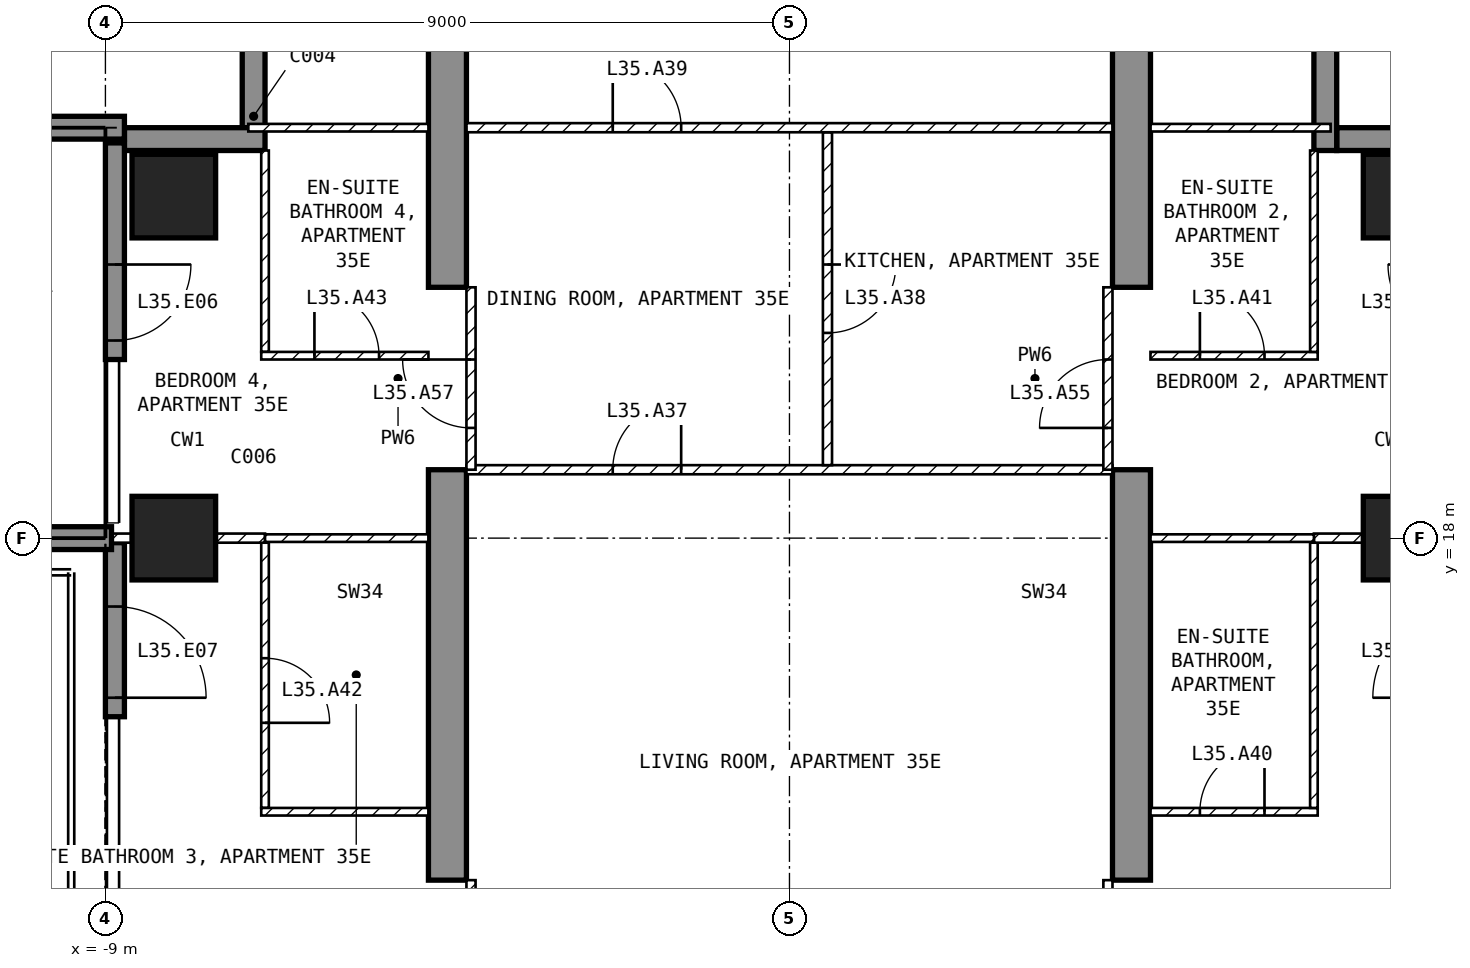
"""IFC4 building model, lengths in metres.
Left out: names, types, materials, properties, quantities, classifications, styles, units other than length and angle.
Written with IfcOpenShell. Run it as: python <this file> out.ifc"""

import sys

from ifc_helpers import new_model, si_unit, direction, frame, frame_2d, origin, origin_2d, place, context, subcontext, project, spatial, polyline, rectangle, outline, extrude, element, fill, save


model = new_model("IFC4")
c1 = context("Model", 3, precision=1e-05, world=origin(), true_north=direction((0.0, 1.0)))
c2 = subcontext(c1, "Body", "Model", "MODEL_VIEW")
j1 = project(units=[si_unit("LENGTHUNIT", "METRE"), si_unit("PLANEANGLEUNIT", "RADIAN")], contexts=[c1])
p1 = place(None, origin())
s1 = spatial("IfcSite", under=j1, at=p1, CompositionType="ELEMENT")
p2 = place(p1, origin())
s2 = spatial("IfcBuilding", under=s1, at=p2, CompositionType="ELEMENT")
p3 = place(p2, frame((0.0, 0.0, 144.4)))
s3 = spatial("IfcBuildingStorey", under=s2, at=p3, CompositionType="ELEMENT", Elevation=144.4)
for number, where, z_axis, x_axis in (
    (1, (-8.1, 18.0, -0.25), (0.0, 0.0, 1.0), (1.0, 0.0, 0.0)),
    (2, (-8.1, 22.5, -0.25), (0.0, 0.0, 1.0), (1.0, 0.0, 0.0)),
    (3, (8.1, 18.0, -0.25), (0.0, 0.0, 1.0), (1.0, 0.0, 0.0)),
    (4, (8.1, 22.5, -0.25), (0.0, 0.0, 1.0), (1.0, 0.0, 0.0)),
):
    element("IfcColumn", number, at=place(p3, frame(where, z_axis=z_axis, x_axis=x_axis)), inside=s3, PredefinedType="COLUMN", context=c2, shape_type="SweptSolid", body=[
        extrude(rectangle(XDim=1.1, YDim=1.1, at=origin_2d()), origin(), (0.0, 0.0, 1.0), 3.5),
    ])
for number, where, z_axis, x_axis in (
    (5, (-4.75, 9.0, -0.25), (1.0, 0.0, 0.0), (0.0, 1.0, 0.0)),
    (6, (4.25, 9.0, -0.25), (1.0, 0.0, 0.0), (0.0, 1.0, 0.0)),
):
    element("IfcWall", number, at=place(p3, frame(where, z_axis=z_axis, x_axis=x_axis)), inside=s3, PredefinedType="SHEAR", context=c2, shape_type="SweptSolid", body=[
        extrude(outline(polyline([(0.0, 0.0), (2.1, 0.0), (2.1, 2.65), (4.5, 2.65), (4.5, 0.0), (9.9, 0.0), (9.9, 2.65), (12.3, 2.65), (12.3, 0.0), (16.55, 0.0), (16.55, 3.5), (0.0, 3.5), (0.0, 0.0)])), origin(), (0.0, 0.0, 1.0), 0.5),
    ])
p4 = place(p3, frame((-8.875, 23.2, 0.0), z_axis=(0.0, 0.0, 1.0), x_axis=(0.0, -1.0, 0.0)))
e7 = element("IfcWall", 7, at=p4, inside=s3, PredefinedType="SOLIDWALL", context=c2, shape_type="SweptSolid", body=[
    extrude(rectangle(XDim=2.85, YDim=0.25, at=frame_2d((1.425, 0.0))), origin(), (0.0, 0.0, 1.0), 3.25),
])
p5 = place(p4, frame((1.6, 0.0, 0.0)))
e8 = element("IfcOpeningElement", 8, at=p5, cuts=e7, PredefinedType="OPENING", context=c2, shape_type="SweptSolid", body=[
    extrude(rectangle(XDim=1.0, YDim=2.4, at=frame_2d((0.5, 1.2))), frame((0.0, 0.135, 0.0), z_axis=(0.0, -1.0, 0.0), x_axis=(1.0, 0.0, 0.0)), (0.0, 0.0, 1.0), 0.27),
])
p6 = place(p3, frame((-8.875, 17.94, 0.0), z_axis=(0.0, 0.0, 1.0), x_axis=(0.0, -1.0, 0.0)))
e9 = element("IfcWall", 9, at=p6, inside=s3, PredefinedType="SOLIDWALL", context=c2, shape_type="SweptSolid", body=[
    extrude(rectangle(XDim=2.29, YDim=0.25, at=frame_2d((1.145, 0.0))), origin(), (0.0, 0.0, 1.0), 3.25),
])
p7 = place(p6, frame((0.84, 0.0, 0.0)))
e10 = element("IfcOpeningElement", 10, at=p7, cuts=e9, PredefinedType="OPENING", context=c2, shape_type="SweptSolid", body=[
    extrude(rectangle(XDim=1.2, YDim=2.4, at=frame_2d((0.6, 1.2))), frame((0.0, 0.135, 0.0), z_axis=(0.0, -1.0, 0.0), x_axis=(1.0, 0.0, 0.0)), (0.0, 0.0, 1.0), 0.27),
])
p8 = place(p3, frame((8.75, 23.25, 0.0), z_axis=(0.0, 0.0, 1.0), x_axis=(-1.0, 0.0, 0.0)))
e11 = element("IfcWall", 11, at=p8, inside=s3, PredefinedType="SOLIDWALL", context=c2, shape_type="SweptSolid", body=[
    extrude(rectangle(XDim=1.55, YDim=0.3, at=frame_2d((0.775, 0.0))), origin(), (0.0, 0.0, 1.0), 3.25),
])
p9 = place(p3, frame((7.05, 23.1, 0.0), z_axis=(0.0, 0.0, 1.0), x_axis=(0.0, 1.0, 0.0)))
e12 = element("IfcWall", 12, at=p9, inside=s3, PredefinedType="SOLIDWALL", context=c2, shape_type="SweptSolid", body=[
    extrude(rectangle(XDim=1.8, YDim=0.3, at=frame_2d((0.9, 0.0))), origin(), (0.0, 0.0, 1.0), 3.25),
])
p10 = place(p3, frame((-7.05, 25.2, 0.0), z_axis=(0.0, 0.0, 1.0), x_axis=(0.0, -1.0, 0.0)))
e13 = element("IfcWall", 13, at=p10, inside=s3, PredefinedType="SOLIDWALL", context=c2, shape_type="SweptSolid", body=[
    extrude(rectangle(XDim=1.8, YDim=0.3, at=frame_2d((0.9, 0.0))), origin(), (0.0, 0.0, 1.0), 3.25),
])
p11 = place(p3, frame((-6.9, 23.25, 0.0), z_axis=(0.0, 0.0, 1.0), x_axis=(-1.0, 0.0, 0.0)))
e14 = element("IfcWall", 14, at=p11, inside=s3, PredefinedType="SOLIDWALL", context=c2, shape_type="SweptSolid", body=[
    extrude(rectangle(XDim=1.85, YDim=0.3, at=frame_2d((0.925, 0.0))), origin(), (0.0, 0.0, 1.0), 3.25),
])
p12 = place(p3, frame((-8.92, 18.0, 0.0), z_axis=(0.0, 0.0, 1.0), x_axis=(-1.0, 0.0, 0.0)))
e15 = element("IfcWall", 15, at=p12, inside=s3, PredefinedType="SOLIDWALL", context=c2, shape_type="SweptSolid", body=[
    extrude(rectangle(XDim=2.82, YDim=0.3, at=frame_2d((1.41, 0.0))), origin(), (0.0, 0.0, 1.0), 3.25),
])
p13 = place(p3, frame((-8.75, 23.4, 0.0), z_axis=(0.0, 0.0, 1.0), x_axis=(-1.0, 0.0, 0.0)))
e16 = element("IfcWall", 16, at=p13, inside=s3, PredefinedType="SOLIDWALL", context=c2, shape_type="SweptSolid", body=[
    extrude(rectangle(XDim=2.95, YDim=0.3, at=frame_2d((1.475, 0.0))), origin(), (0.0, 0.0, 1.0), 3.25),
])
p14 = place(p3, frame((-4.25, 18.9, 0.0), z_axis=(0.0, 0.0, 1.0), x_axis=(1.0, 0.0, 0.0)))
e17 = element("IfcWall", 17, at=p14, inside=s3, PredefinedType="PARTITIONING", context=c2, shape_type="SweptSolid", body=[
    extrude(rectangle(XDim=8.5, YDim=0.12, at=frame_2d((4.25, 0.0))), origin(), (0.0, 0.0, 1.0), 3.25),
])
p15 = place(p14, frame((1.925, 0.0, 0.0)))
e18 = element("IfcOpeningElement", 18, at=p15, cuts=e17, PredefinedType="OPENING", context=c2, shape_type="SweptSolid", body=[
    extrude(rectangle(XDim=0.9, YDim=2.1, at=frame_2d((0.45, 1.05))), frame((0.0, 0.07, 0.0), z_axis=(0.0, -1.0, 0.0), x_axis=(1.0, 0.0, 0.0)), (0.0, 0.0, 1.0), 0.14),
])
p16 = place(p3, frame((0.5, 23.34, 0.0), z_axis=(0.0, 0.0, 1.0), x_axis=(0.0, -1.0, 0.0)))
e19 = element("IfcWall", 19, at=p16, inside=s3, PredefinedType="PARTITIONING", context=c2, shape_type="SweptSolid", body=[
    extrude(rectangle(XDim=4.38, YDim=0.12, at=frame_2d((2.19, 0.0))), origin(), (0.0, 0.0, 1.0), 3.25),
])
p17 = place(p16, frame((1.74, 0.0, 0.0)))
e20 = element("IfcOpeningElement", 20, at=p17, cuts=e19, PredefinedType="OPENING", context=c2, shape_type="SweptSolid", body=[
    extrude(rectangle(XDim=0.9, YDim=2.1, at=frame_2d((0.45, 1.05))), frame((0.0, 0.07, 0.0), z_axis=(0.0, -1.0, 0.0), x_axis=(1.0, 0.0, 0.0)), (0.0, 0.0, 1.0), 0.14),
])
p18 = place(p3, frame((-4.25, 23.4, 0.0), z_axis=(0.0, 0.0, 1.0), x_axis=(1.0, 0.0, 0.0)))
e21 = element("IfcWall", 21, at=p18, inside=s3, PredefinedType="PARTITIONING", context=c2, shape_type="SweptSolid", body=[
    extrude(rectangle(XDim=8.5, YDim=0.12, at=frame_2d((4.25, 0.0))), origin(), (0.0, 0.0, 1.0), 3.25),
])
p19 = place(p18, frame((1.925, 0.0, 0.0)))
e22 = element("IfcOpeningElement", 22, at=p19, cuts=e21, PredefinedType="OPENING", context=c2, shape_type="SweptSolid", body=[
    extrude(rectangle(XDim=0.9, YDim=2.1, at=frame_2d((0.45, 1.05))), frame((0.0, 0.07, 0.0), z_axis=(0.0, -1.0, 0.0), x_axis=(1.0, 0.0, 0.0)), (0.0, 0.0, 1.0), 0.14),
])
p20 = place(p3, frame((4.75, 14.4, 0.0), z_axis=(0.0, 0.0, 1.0), x_axis=(1.0, 0.0, 0.0)))
e23 = element("IfcWall", 23, at=p20, inside=s3, PredefinedType="PARTITIONING", context=c2, shape_type="SweptSolid", body=[
    extrude(rectangle(XDim=2.2, YDim=0.1, at=frame_2d((1.1, 0.0))), origin(), (0.0, 0.0, 1.0), 3.25),
])
p21 = place(p20, frame((0.65, 0.0, 0.0)))
e24 = element("IfcOpeningElement", 24, at=p21, cuts=e23, PredefinedType="OPENING", context=c2, shape_type="SweptSolid", body=[
    extrude(rectangle(XDim=0.85, YDim=2.1, at=frame_2d((0.425, 1.05))), frame((0.0, 0.06, 0.0), z_axis=(0.0, -1.0, 0.0), x_axis=(1.0, 0.0, 0.0)), (0.0, 0.0, 1.0), 0.12),
])
p22 = place(p3, frame((6.9, 14.45, 0.0), z_axis=(0.0, 0.0, 1.0), x_axis=(0.0, 1.0, 0.0)))
e25 = element("IfcWall", 25, at=p22, inside=s3, PredefinedType="PARTITIONING", context=c2, shape_type="SweptSolid", body=[
    extrude(rectangle(XDim=3.49, YDim=0.1, at=frame_2d((1.745, 0.0))), origin(), (0.0, 0.0, 1.0), 3.25),
])
p23 = place(p3, frame((6.9, 18.0, 0.0), z_axis=(0.0, 0.0, 1.0), x_axis=(1.0, 0.0, 0.0)))
e26 = element("IfcWall", 26, at=p23, inside=s3, PredefinedType="PARTITIONING", context=c2, shape_type="SweptSolid", body=[
    extrude(rectangle(XDim=2.02, YDim=0.12, at=frame_2d((1.01, 0.0))), origin(), (0.0, 0.0, 1.0), 2.414),
])
p24 = place(p3, frame((4.75, 18.0, 0.0), z_axis=(0.0, 0.0, 1.0), x_axis=(1.0, 0.0, 0.0)))
e27 = element("IfcWall", 27, at=p24, inside=s3, PredefinedType="PARTITIONING", context=c2, shape_type="SweptSolid", body=[
    extrude(rectangle(XDim=2.15, YDim=0.1, at=frame_2d((1.075, 0.0))), origin(), (0.0, 0.0, 1.0), 2.414),
])
p25 = place(p3, frame((4.75, 20.4, 0.0), z_axis=(0.0, 0.0, 1.0), x_axis=(1.0, 0.0, 0.0)))
e28 = element("IfcWall", 28, at=p25, inside=s3, PredefinedType="PARTITIONING", context=c2, shape_type="SweptSolid", body=[
    extrude(rectangle(XDim=2.2, YDim=0.1, at=frame_2d((1.1, 0.0))), origin(), (0.0, 0.0, 1.0), 3.25),
])
p26 = place(p25, frame((0.65, 0.0, 0.0)))
e29 = element("IfcOpeningElement", 29, at=p26, cuts=e28, PredefinedType="OPENING", context=c2, shape_type="SweptSolid", body=[
    extrude(rectangle(XDim=0.85, YDim=2.1, at=frame_2d((0.425, 1.05))), frame((0.0, 0.06, 0.0), z_axis=(0.0, -1.0, 0.0), x_axis=(1.0, 0.0, 0.0)), (0.0, 0.0, 1.0), 0.12),
])
p27 = place(p3, frame((6.9, 20.45, 0.0), z_axis=(0.0, 0.0, 1.0), x_axis=(0.0, 1.0, 0.0)))
e30 = element("IfcWall", 30, at=p27, inside=s3, PredefinedType="PARTITIONING", context=c2, shape_type="SweptSolid", body=[
    extrude(rectangle(XDim=2.65, YDim=0.1, at=frame_2d((1.325, 0.0))), origin(), (0.0, 0.0, 1.0), 3.25),
])
p28 = place(p3, frame((4.75, 23.4, 0.0), z_axis=(0.0, 0.0, 1.0), x_axis=(1.0, 0.0, 0.0)))
e31 = element("IfcWall", 31, at=p28, inside=s3, PredefinedType="PARTITIONING", context=c2, shape_type="SweptSolid", body=[
    extrude(rectangle(XDim=2.37, YDim=0.1, at=frame_2d((1.185, 0.0))), origin(), (0.0, 0.0, 1.0), 3.25),
])
p29 = place(p3, frame((-6.9, 17.94, 0.0), z_axis=(0.0, 0.0, 1.0), x_axis=(0.0, -1.0, 0.0)))
e32 = element("IfcWall", 32, at=p29, inside=s3, PredefinedType="PARTITIONING", context=c2, shape_type="SweptSolid", body=[
    extrude(rectangle(XDim=3.49, YDim=0.1, at=frame_2d((1.745, 0.0))), origin(), (0.0, 0.0, 1.0), 3.25),
])
p30 = place(p29, frame((1.52, 0.0, 0.0)))
e33 = element("IfcOpeningElement", 33, at=p30, cuts=e32, PredefinedType="OPENING", context=c2, shape_type="SweptSolid", body=[
    extrude(rectangle(XDim=0.85, YDim=2.1, at=frame_2d((0.425, 1.05))), frame((0.0, 0.06, 0.0), z_axis=(0.0, -1.0, 0.0), x_axis=(1.0, 0.0, 0.0)), (0.0, 0.0, 1.0), 0.12),
])
p31 = place(p3, frame((-6.95, 14.4, 0.0), z_axis=(0.0, 0.0, 1.0), x_axis=(1.0, 0.0, 0.0)))
e34 = element("IfcWall", 34, at=p31, inside=s3, PredefinedType="PARTITIONING", context=c2, shape_type="SweptSolid", body=[
    extrude(rectangle(XDim=2.2, YDim=0.1, at=frame_2d((1.1, 0.0))), origin(), (0.0, 0.0, 1.0), 3.25),
])
p32 = place(p3, frame((-8.92, 18.0, 0.0), z_axis=(0.0, 0.0, 1.0), x_axis=(1.0, 0.0, 0.0)))
e35 = element("IfcWall", 35, at=p32, inside=s3, PredefinedType="PARTITIONING", context=c2, shape_type="SweptSolid", body=[
    extrude(rectangle(XDim=2.02, YDim=0.12, at=frame_2d((1.01, 0.0))), origin(), (0.0, 0.0, 1.0), 2.414),
])
p33 = place(p3, frame((-6.9, 18.0, 0.0), z_axis=(0.0, 0.0, 1.0), x_axis=(1.0, 0.0, 0.0)))
e36 = element("IfcWall", 36, at=p33, inside=s3, PredefinedType="PARTITIONING", context=c2, shape_type="SweptSolid", body=[
    extrude(rectangle(XDim=2.15, YDim=0.1, at=frame_2d((1.075, 0.0))), origin(), (0.0, 0.0, 1.0), 2.414),
])
p34 = place(p3, frame((-6.9, 23.1, 0.0), z_axis=(0.0, 0.0, 1.0), x_axis=(0.0, -1.0, 0.0)))
e37 = element("IfcWall", 37, at=p34, inside=s3, PredefinedType="PARTITIONING", context=c2, shape_type="SweptSolid", body=[
    extrude(rectangle(XDim=2.65, YDim=0.1, at=frame_2d((1.325, 0.0))), origin(), (0.0, 0.0, 1.0), 3.25),
])
p35 = place(p3, frame((-6.95, 20.4, 0.0), z_axis=(0.0, 0.0, 1.0), x_axis=(1.0, 0.0, 0.0)))
e38 = element("IfcWall", 38, at=p35, inside=s3, PredefinedType="PARTITIONING", context=c2, shape_type="SweptSolid", body=[
    extrude(rectangle(XDim=2.2, YDim=0.1, at=frame_2d((1.1, 0.0))), origin(), (0.0, 0.0, 1.0), 3.25),
])
p36 = place(p35, frame((0.7, 0.0, 0.0)))
e39 = element("IfcOpeningElement", 39, at=p36, cuts=e38, PredefinedType="OPENING", context=c2, shape_type="SweptSolid", body=[
    extrude(rectangle(XDim=0.85, YDim=2.1, at=frame_2d((0.425, 1.05))), frame((0.0, 0.06, 0.0), z_axis=(0.0, -1.0, 0.0), x_axis=(1.0, 0.0, 0.0)), (0.0, 0.0, 1.0), 0.12),
])
p37 = place(p3, frame((-7.12, 23.4, 0.0), z_axis=(0.0, 0.0, 1.0), x_axis=(1.0, 0.0, 0.0)))
e40 = element("IfcWall", 40, at=p37, inside=s3, PredefinedType="PARTITIONING", context=c2, shape_type="SweptSolid", body=[
    extrude(rectangle(XDim=2.37, YDim=0.1, at=frame_2d((1.185, 0.0))), origin(), (0.0, 0.0, 1.0), 3.25),
])
p38 = place(p3, frame((4.19, 11.1, 0.0), z_axis=(0.0, 0.0, 1.0), x_axis=(0.0, 1.0, 0.0)))
e41 = element("IfcWall", 41, at=p38, inside=s3, PredefinedType="PARTITIONING", context=c2, shape_type="SweptSolid", body=[
    extrude(rectangle(XDim=2.4, YDim=0.12, at=frame_2d((1.2, 0.0))), origin(), (0.0, 0.0, 1.0), 2.4),
])
p39 = place(p38, frame((0.75, 0.0, 0.0)))
e42 = element("IfcOpeningElement", 42, at=p39, cuts=e41, PredefinedType="OPENING", context=c2, shape_type="SweptSolid", body=[
    extrude(rectangle(XDim=0.9, YDim=2.1, at=frame_2d((0.45, 1.05))), frame((0.0, 0.07, 0.0), z_axis=(0.0, -1.0, 0.0), x_axis=(1.0, 0.0, 0.0)), (0.0, 0.0, 1.0), 0.14),
])
p40 = place(p3, frame((4.19, 18.9, 0.0), z_axis=(0.0, 0.0, 1.0), x_axis=(0.0, 1.0, 0.0)))
e43 = element("IfcWall", 43, at=p40, inside=s3, PredefinedType="PARTITIONING", context=c2, shape_type="SweptSolid", body=[
    extrude(rectangle(XDim=2.4, YDim=0.12, at=frame_2d((1.2, 0.0))), origin(), (0.0, 0.0, 1.0), 2.4),
])
p41 = place(p40, frame((0.55, 0.0, 0.0)))
e44 = element("IfcOpeningElement", 44, at=p41, cuts=e43, PredefinedType="OPENING", context=c2, shape_type="SweptSolid", body=[
    extrude(rectangle(XDim=0.9, YDim=2.1, at=frame_2d((0.45, 1.05))), frame((0.0, 0.07, 0.0), z_axis=(0.0, -1.0, 0.0), x_axis=(1.0, 0.0, 0.0)), (0.0, 0.0, 1.0), 0.14),
])
p42 = place(p3, frame((-4.19, 11.1, 0.0), z_axis=(0.0, 0.0, 1.0), x_axis=(0.0, 1.0, 0.0)))
e45 = element("IfcWall", 45, at=p42, inside=s3, PredefinedType="PARTITIONING", context=c2, shape_type="SweptSolid", body=[
    extrude(rectangle(XDim=2.4, YDim=0.12, at=frame_2d((1.2, 0.0))), origin(), (0.0, 0.0, 1.0), 2.4),
])
p43 = place(p42, frame((0.75, 0.0, 0.0)))
e46 = element("IfcOpeningElement", 46, at=p43, cuts=e45, PredefinedType="OPENING", context=c2, shape_type="SweptSolid", body=[
    extrude(rectangle(XDim=0.9, YDim=2.1, at=frame_2d((0.45, 1.05))), frame((0.0, 0.07, 0.0), z_axis=(0.0, -1.0, 0.0), x_axis=(1.0, 0.0, 0.0)), (0.0, 0.0, 1.0), 0.14),
])
p44 = place(p3, frame((-4.19, 18.9, 0.0), z_axis=(0.0, 0.0, 1.0), x_axis=(0.0, 1.0, 0.0)))
e47 = element("IfcWall", 47, at=p44, inside=s3, PredefinedType="PARTITIONING", context=c2, shape_type="SweptSolid", body=[
    extrude(rectangle(XDim=2.4, YDim=0.12, at=frame_2d((1.2, 0.0))), origin(), (0.0, 0.0, 1.0), 2.4),
])
p45 = place(p44, frame((0.55, 0.0, 0.0)))
e48 = element("IfcOpeningElement", 48, at=p45, cuts=e47, PredefinedType="OPENING", context=c2, shape_type="SweptSolid", body=[
    extrude(rectangle(XDim=0.9, YDim=2.1, at=frame_2d((0.45, 1.05))), frame((0.0, 0.07, 0.0), z_axis=(0.0, -1.0, 0.0), x_axis=(1.0, 0.0, 0.0)), (0.0, 0.0, 1.0), 0.14),
])
p46 = place(p5, origin())
e49 = element("IfcDoor", 49, at=p46, inside=s3, OperationType="SINGLE_SWING_LEFT", PredefinedType="DOOR", context=c2, shape_type="SweptSolid", body=[
    extrude(rectangle(XDim=1.0, YDim=2.4, at=frame_2d((0.5, 1.2))), frame((0.0, 0.025, 0.0), z_axis=(0.0, -1.0, 0.0), x_axis=(1.0, 0.0, 0.0)), (0.0, 0.0, 1.0), 0.05),
])
fill(e8, e49)
p47 = place(p7, origin())
e50 = element("IfcDoor", 50, at=p47, inside=s3, OperationType="SINGLE_SWING_RIGHT", PredefinedType="DOOR", context=c2, shape_type="SweptSolid", body=[
    extrude(rectangle(XDim=1.2, YDim=2.4, at=frame_2d((0.6, 1.2))), frame((0.0, 0.025, 0.0), z_axis=(0.0, -1.0, 0.0), x_axis=(1.0, 0.0, 0.0)), (0.0, 0.0, 1.0), 0.05),
])
fill(e10, e50)
p48 = place(p15, origin())
e51 = element("IfcDoor", 51, at=p48, inside=s3, OperationType="SINGLE_SWING_RIGHT", PredefinedType="DOOR", context=c2, shape_type="SweptSolid", body=[
    extrude(rectangle(XDim=0.9, YDim=2.1, at=frame_2d((0.45, 1.05))), frame((0.0, 0.025, 0.0), z_axis=(0.0, -1.0, 0.0), x_axis=(1.0, 0.0, 0.0)), (0.0, 0.0, 1.0), 0.05),
])
fill(e18, e51)
p49 = place(p17, origin())
e52 = element("IfcDoor", 52, at=p49, inside=s3, OperationType="SINGLE_SWING_LEFT", PredefinedType="DOOR", context=c2, shape_type="SweptSolid", body=[
    extrude(rectangle(XDim=0.9, YDim=2.1, at=frame_2d((0.45, 1.05))), frame((0.0, 0.025, 0.0), z_axis=(0.0, -1.0, 0.0), x_axis=(1.0, 0.0, 0.0)), (0.0, 0.0, 1.0), 0.05),
])
fill(e20, e52)
p50 = place(p19, origin())
e53 = element("IfcDoor", 53, at=p50, inside=s3, OperationType="SINGLE_SWING_LEFT", PredefinedType="DOOR", context=c2, shape_type="SweptSolid", body=[
    extrude(rectangle(XDim=0.9, YDim=2.1, at=frame_2d((0.45, 1.05))), frame((0.0, 0.025, 0.0), z_axis=(0.0, -1.0, 0.0), x_axis=(1.0, 0.0, 0.0)), (0.0, 0.0, 1.0), 0.05),
])
fill(e22, e53)
p51 = place(p21, origin())
e54 = element("IfcDoor", 54, at=p51, inside=s3, OperationType="SINGLE_SWING_RIGHT", PredefinedType="DOOR", context=c2, shape_type="SweptSolid", body=[
    extrude(rectangle(XDim=0.85, YDim=2.1, at=frame_2d((0.425, 1.05))), frame((0.0, 0.025, 0.0), z_axis=(0.0, -1.0, 0.0), x_axis=(1.0, 0.0, 0.0)), (0.0, 0.0, 1.0), 0.05),
])
fill(e24, e54)
p52 = place(p26, origin())
e55 = element("IfcDoor", 55, at=p52, inside=s3, OperationType="SINGLE_SWING_LEFT", PredefinedType="DOOR", context=c2, shape_type="SweptSolid", body=[
    extrude(rectangle(XDim=0.85, YDim=2.1, at=frame_2d((0.425, 1.05))), frame((0.0, 0.025, 0.0), z_axis=(0.0, -1.0, 0.0), x_axis=(1.0, 0.0, 0.0)), (0.0, 0.0, 1.0), 0.05),
])
fill(e29, e55)
p53 = place(p30, origin())
e56 = element("IfcDoor", 56, at=p53, inside=s3, OperationType="SINGLE_SWING_RIGHT", PredefinedType="DOOR", context=c2, shape_type="SweptSolid", body=[
    extrude(rectangle(XDim=0.85, YDim=2.1, at=frame_2d((0.425, 1.05))), frame((0.0, 0.025, 0.0), z_axis=(0.0, -1.0, 0.0), x_axis=(1.0, 0.0, 0.0)), (0.0, 0.0, 1.0), 0.05),
])
fill(e33, e56)
p54 = place(p36, origin())
e57 = element("IfcDoor", 57, at=p54, inside=s3, OperationType="SINGLE_SWING_LEFT", PredefinedType="DOOR", context=c2, shape_type="SweptSolid", body=[
    extrude(rectangle(XDim=0.85, YDim=2.1, at=frame_2d((0.425, 1.05))), frame((0.0, 0.025, 0.0), z_axis=(0.0, -1.0, 0.0), x_axis=(1.0, 0.0, 0.0)), (0.0, 0.0, 1.0), 0.05),
])
fill(e39, e57)
p55 = place(p41, origin())
e58 = element("IfcDoor", 58, at=p55, inside=s3, OperationType="SINGLE_SWING_LEFT", PredefinedType="DOOR", context=c2, shape_type="SweptSolid", body=[
    extrude(rectangle(XDim=0.9, YDim=2.1, at=frame_2d((0.45, 1.05))), frame((0.0, 0.025, 0.0), z_axis=(0.0, -1.0, 0.0), x_axis=(1.0, 0.0, 0.0)), (0.0, 0.0, 1.0), 0.05),
])
fill(e44, e58)
p56 = place(p45, origin())
e59 = element("IfcDoor", 59, at=p56, inside=s3, OperationType="SINGLE_SWING_RIGHT", PredefinedType="DOOR", context=c2, shape_type="SweptSolid", body=[
    extrude(rectangle(XDim=0.9, YDim=2.1, at=frame_2d((0.45, 1.05))), frame((0.0, 0.025, 0.0), z_axis=(0.0, -1.0, 0.0), x_axis=(1.0, 0.0, 0.0)), (0.0, 0.0, 1.0), 0.05),
])
fill(e48, e59)
save(model, sys.argv[1])
